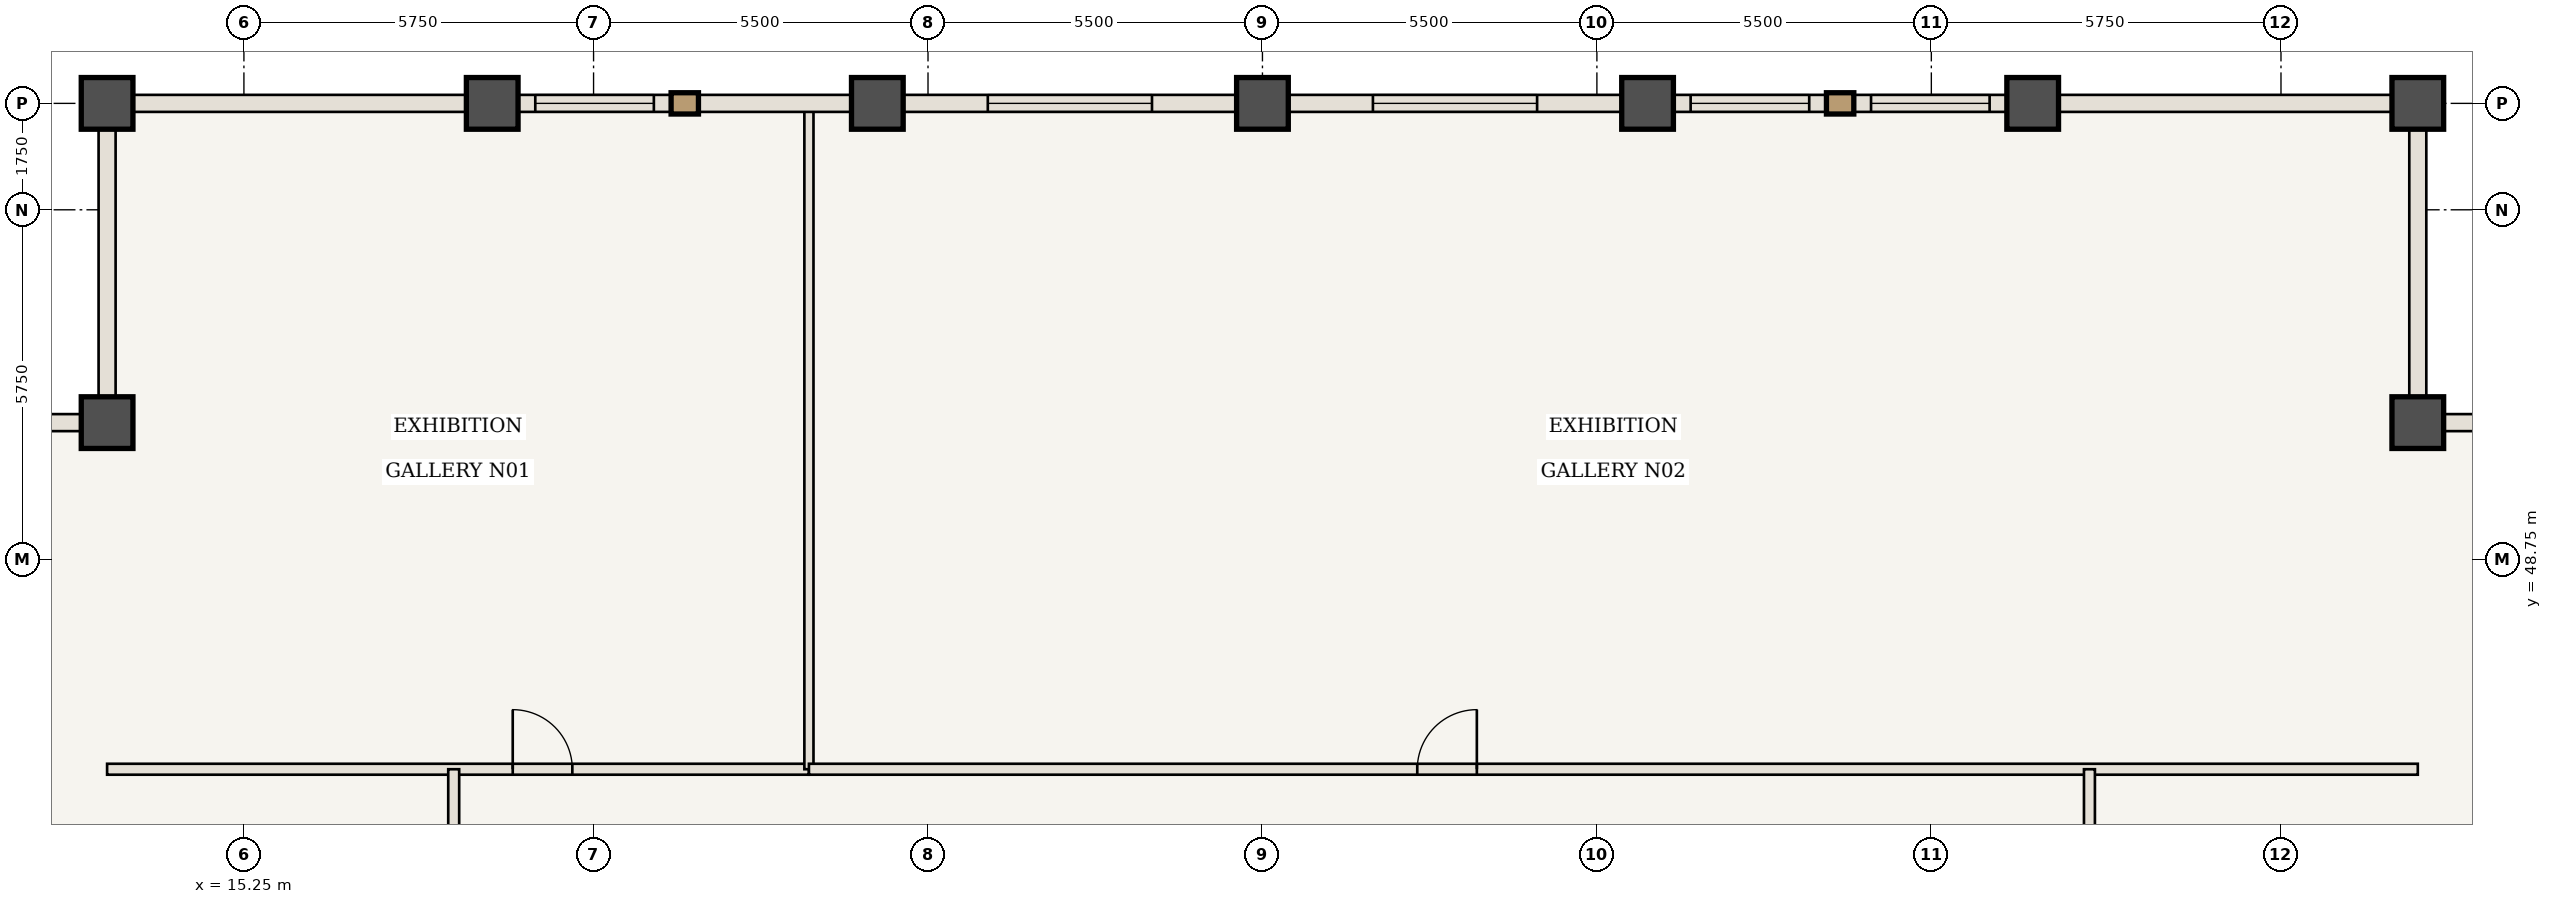
"""IFC4 building model, lengths in metres.
Left out: names, types, materials, properties, quantities, classifications, styles, units other than length and angle.
Written with IfcOpenShell. Run it as: python <this file> out.ifc"""

import sys

from ifc_helpers import new_model, si_unit, direction, frame, frame_2d, origin, origin_2d, place, context, subcontext, project, spatial, rectangle, extrude, element, fill, save


model = new_model("IFC4")
c1 = context("Model", 3, precision=1e-05, world=origin(), true_north=direction((0.0, 1.0)))
c2 = subcontext(c1, "Body", "Model", "MODEL_VIEW")
j1 = project(units=[si_unit("LENGTHUNIT", "METRE"), si_unit("PLANEANGLEUNIT", "RADIAN")], contexts=[c1])
p1 = place(None, origin())
s1 = spatial("IfcSite", under=j1, at=p1, CompositionType="ELEMENT")
p2 = place(p1, origin())
s2 = spatial("IfcBuilding", under=s1, at=p2, CompositionType="ELEMENT")
p3 = place(p2, frame((0.0, 0.0, 210.0)))
s3 = spatial("IfcBuildingStorey", under=s2, at=p3, CompositionType="ELEMENT", Elevation=210.0)
for number, where, z_axis, x_axis in (
    (1, (51.0, 51.0, 0.0), (0.0, 0.0, 1.0), (1.0, 0.0, 0.0)),
    (2, (51.0, 56.25, 0.0), (0.0, 0.0, 1.0), (1.0, 0.0, 0.0)),
    (3, (13.0, 56.25, 0.0), (0.0, 0.0, 1.0), (1.0, 0.0, 0.0)),
    (4, (13.0, 51.0, 0.0), (0.0, 0.0, 1.0), (1.0, 0.0, 0.0)),
    (5, (19.333, 56.25, 0.0), (0.0, 0.0, 1.0), (1.0, 0.0, 0.0)),
    (6, (25.667, 56.25, 0.0), (0.0, 0.0, 1.0), (1.0, 0.0, 0.0)),
    (7, (32.0, 56.25, 0.0), (0.0, 0.0, 1.0), (1.0, 0.0, 0.0)),
    (8, (38.333, 56.25, 0.0), (0.0, 0.0, 1.0), (1.0, 0.0, 0.0)),
    (9, (44.667, 56.25, 0.0), (0.0, 0.0, 1.0), (1.0, 0.0, 0.0)),
):
    element("IfcColumn", number, at=place(p3, frame(where, z_axis=z_axis, x_axis=x_axis)), inside=s3, PredefinedType="COLUMN", context=c2, shape_type="SweptSolid", body=[
        extrude(rectangle(XDim=0.85, YDim=0.85, at=origin_2d()), origin(), (0.0, 0.0, 1.0), 3.85),
    ])
p4 = place(p3, frame((13.0, 45.3, 0.0), z_axis=(0.0, 0.0, 1.0), x_axis=(1.0, 0.0, 0.0)))
e10 = element("IfcWall", 10, at=p4, inside=s3, PredefinedType="STANDARD", context=c2, shape_type="SweptSolid", body=[
    extrude(rectangle(XDim=11.542, YDim=0.18, at=frame_2d((5.771, 0.0))), origin(), (0.0, 0.0, 1.0), 3.685),
])
p5 = place(p4, frame((6.671, 0.0, 0.0)))
e11 = element("IfcOpeningElement", 11, at=p5, cuts=e10, PredefinedType="OPENING", context=c2, shape_type="SweptSolid", body=[
    extrude(rectangle(XDim=0.98, YDim=2.2, at=frame_2d((0.49, 1.1))), frame((0.0, 0.1, 0.0), z_axis=(0.0, -1.0, 0.0), x_axis=(1.0, 0.0, 0.0)), (0.0, 0.0, 1.0), 0.2),
])
p6 = place(p3, frame((24.542, 45.3, 0.0), z_axis=(0.0, 0.0, 1.0), x_axis=(0.0, 1.0, 0.0)))
e12 = element("IfcWall", 12, at=p6, inside=s3, PredefinedType="STANDARD", context=c2, shape_type="SweptSolid", body=[
    extrude(rectangle(XDim=10.89, YDim=0.15, at=frame_2d((5.445, 0.0))), origin(), (0.0, 0.0, 1.0), 3.685),
])
p7 = place(p3, frame((24.542, 45.3, 0.0), z_axis=(0.0, 0.0, 1.0), x_axis=(1.0, 0.0, 0.0)))
e13 = element("IfcWall", 13, at=p7, inside=s3, PredefinedType="STANDARD", context=c2, shape_type="SweptSolid", body=[
    extrude(rectangle(XDim=26.458, YDim=0.18, at=frame_2d((13.229, 0.0))), origin(), (0.0, 0.0, 1.0), 3.685),
])
p8 = place(p7, frame((10.004, 0.0, 0.0)))
e14 = element("IfcOpeningElement", 14, at=p8, cuts=e13, PredefinedType="OPENING", context=c2, shape_type="SweptSolid", body=[
    extrude(rectangle(XDim=0.98, YDim=2.2, at=frame_2d((0.49, 1.1))), frame((0.0, 0.1, 0.0), z_axis=(0.0, -1.0, 0.0), x_axis=(1.0, 0.0, 0.0)), (0.0, 0.0, 1.0), 0.2),
])
p9 = place(p3, frame((18.7, 39.258, 0.0), z_axis=(0.0, 0.0, 1.0), x_axis=(0.0, 1.0, 0.0)))
e15 = element("IfcWall", 15, at=p9, inside=s3, PredefinedType="STANDARD", context=c2, shape_type="SweptSolid", body=[
    extrude(rectangle(XDim=6.042, YDim=0.18, at=frame_2d((3.021, 0.0))), origin(), (0.0, 0.0, 1.0), 3.685),
])
p10 = place(p9, frame((1.071, 0.0, 0.0)))
e16 = element("IfcOpeningElement", 16, at=p10, cuts=e15, PredefinedType="OPENING", context=c2, shape_type="SweptSolid", body=[
    extrude(rectangle(XDim=0.98, YDim=2.2, at=frame_2d((0.49, 1.1))), frame((0.0, 0.1, 0.0), z_axis=(0.0, -1.0, 0.0), x_axis=(1.0, 0.0, 0.0)), (0.0, 0.0, 1.0), 0.2),
])
p11 = place(p3, frame((45.6, 32.85, 0.0), z_axis=(0.0, 0.0, 1.0), x_axis=(0.0, 1.0, 0.0)))
e17 = element("IfcWall", 17, at=p11, inside=s3, PredefinedType="STANDARD", context=c2, shape_type="SweptSolid", body=[
    extrude(rectangle(XDim=12.45, YDim=0.18, at=frame_2d((6.225, 0.0))), origin(), (0.0, 0.0, 1.0), 3.685),
])
p12 = place(p11, frame((5.725, 0.0, 0.0)))
e18 = element("IfcOpeningElement", 18, at=p12, cuts=e17, PredefinedType="OPENING", context=c2, shape_type="SweptSolid", body=[
    extrude(rectangle(XDim=0.98, YDim=2.2, at=frame_2d((0.49, 1.1))), frame((0.0, 0.1, 0.0), z_axis=(0.0, -1.0, 0.0), x_axis=(1.0, 0.0, 0.0)), (0.0, 0.0, 1.0), 0.2),
])
p13 = place(p3, frame((13.0, 56.25, 0.0), z_axis=(0.0, 0.0, 1.0), x_axis=(1.0, 0.0, 0.0)))
e19 = element("IfcWall", 19, at=p13, inside=s3, PredefinedType="USERDEFINED", context=c2, shape_type="SweptSolid", body=[
    extrude(rectangle(XDim=6.333, YDim=0.28, at=frame_2d((3.167, 0.0))), origin(), (0.0, 0.0, 1.0), 2.985),
])
p14 = place(p3, frame((19.333, 56.25, 0.0), z_axis=(0.0, 0.0, 1.0), x_axis=(1.0, 0.0, 0.0)))
e20 = element("IfcWall", 20, at=p14, inside=s3, PredefinedType="USERDEFINED", context=c2, shape_type="SweptSolid", body=[
    extrude(rectangle(XDim=6.333, YDim=0.28, at=frame_2d((3.167, 0.0))), origin(), (0.0, 0.0, 1.0), 2.985),
])
p15 = place(p14, frame((0.708, 0.0, 0.85)))
e21 = element("IfcOpeningElement", 21, at=p15, cuts=e20, PredefinedType="OPENING", context=c2, shape_type="SweptSolid", body=[
    extrude(rectangle(XDim=1.95, YDim=1.935, at=frame_2d((0.975, 0.968))), frame((0.0, 0.15, 0.0), z_axis=(0.0, -1.0, 0.0), x_axis=(1.0, 0.0, 0.0)), (0.0, 0.0, 1.0), 0.3),
])
p16 = place(p3, frame((25.667, 56.25, 0.0), z_axis=(0.0, 0.0, 1.0), x_axis=(1.0, 0.0, 0.0)))
e22 = element("IfcWall", 22, at=p16, inside=s3, PredefinedType="USERDEFINED", context=c2, shape_type="SweptSolid", body=[
    extrude(rectangle(XDim=6.333, YDim=0.28, at=frame_2d((3.167, 0.0))), origin(), (0.0, 0.0, 1.0), 2.985),
])
p17 = place(p16, frame((1.817, 0.0, 0.85)))
e23 = element("IfcOpeningElement", 23, at=p17, cuts=e22, PredefinedType="OPENING", context=c2, shape_type="SweptSolid", body=[
    extrude(rectangle(XDim=2.7, YDim=1.935, at=frame_2d((1.35, 0.968))), frame((0.0, 0.15, 0.0), z_axis=(0.0, -1.0, 0.0), x_axis=(1.0, 0.0, 0.0)), (0.0, 0.0, 1.0), 0.3),
])
p18 = place(p3, frame((32.0, 56.25, 0.0), z_axis=(0.0, 0.0, 1.0), x_axis=(1.0, 0.0, 0.0)))
e24 = element("IfcWall", 24, at=p18, inside=s3, PredefinedType="USERDEFINED", context=c2, shape_type="SweptSolid", body=[
    extrude(rectangle(XDim=6.333, YDim=0.28, at=frame_2d((3.167, 0.0))), origin(), (0.0, 0.0, 1.0), 2.985),
])
p19 = place(p18, frame((1.817, 0.0, 0.85)))
e25 = element("IfcOpeningElement", 25, at=p19, cuts=e24, PredefinedType="OPENING", context=c2, shape_type="SweptSolid", body=[
    extrude(rectangle(XDim=2.7, YDim=1.935, at=frame_2d((1.35, 0.968))), frame((0.0, 0.15, 0.0), z_axis=(0.0, -1.0, 0.0), x_axis=(1.0, 0.0, 0.0)), (0.0, 0.0, 1.0), 0.3),
])
p20 = place(p3, frame((38.333, 56.25, 0.0), z_axis=(0.0, 0.0, 1.0), x_axis=(1.0, 0.0, 0.0)))
e26 = element("IfcWall", 26, at=p20, inside=s3, PredefinedType="USERDEFINED", context=c2, shape_type="SweptSolid", body=[
    extrude(rectangle(XDim=6.333, YDim=0.28, at=frame_2d((3.167, 0.0))), origin(), (0.0, 0.0, 1.0), 2.985),
])
p21 = place(p20, frame((0.708, 0.0, 0.85)))
e27 = element("IfcOpeningElement", 27, at=p21, cuts=e26, PredefinedType="OPENING", context=c2, shape_type="SweptSolid", body=[
    extrude(rectangle(XDim=1.95, YDim=1.935, at=frame_2d((0.975, 0.968))), frame((0.0, 0.15, 0.0), z_axis=(0.0, -1.0, 0.0), x_axis=(1.0, 0.0, 0.0)), (0.0, 0.0, 1.0), 0.3),
])
p22 = place(p20, frame((3.675, 0.0, 0.85)))
e28 = element("IfcOpeningElement", 28, at=p22, cuts=e26, PredefinedType="OPENING", context=c2, shape_type="SweptSolid", body=[
    extrude(rectangle(XDim=1.95, YDim=1.935, at=frame_2d((0.975, 0.968))), frame((0.0, 0.15, 0.0), z_axis=(0.0, -1.0, 0.0), x_axis=(1.0, 0.0, 0.0)), (0.0, 0.0, 1.0), 0.3),
])
p23 = place(p3, frame((44.667, 56.25, 0.0), z_axis=(0.0, 0.0, 1.0), x_axis=(1.0, 0.0, 0.0)))
e29 = element("IfcWall", 29, at=p23, inside=s3, PredefinedType="USERDEFINED", context=c2, shape_type="SweptSolid", body=[
    extrude(rectangle(XDim=6.333, YDim=0.28, at=frame_2d((3.167, 0.0))), origin(), (0.0, 0.0, 1.0), 2.985),
])
for number, where, z_axis, x_axis in (
    (30, (51.0, 51.0, 0.0), (0.0, 0.0, 1.0), (1.0, 0.0, 0.0)),
    (31, (51.0, 56.25, 0.0), (0.0, 0.0, 1.0), (0.0, -1.0, 0.0)),
    (32, (13.0, 51.0, 0.0), (0.0, 0.0, 1.0), (0.0, 1.0, 0.0)),
    (33, (7.75, 51.0, 0.0), (0.0, 0.0, 1.0), (1.0, 0.0, 0.0)),
):
    element("IfcWall", number, at=place(p3, frame(where, z_axis=z_axis, x_axis=x_axis)), inside=s3, PredefinedType="USERDEFINED", context=c2, shape_type="SweptSolid", body=[
        extrude(rectangle(XDim=5.25, YDim=0.28, at=frame_2d((2.625, 0.0))), origin(), (0.0, 0.0, 1.0), 2.985),
    ])
p24 = place(p5, origin())
e34 = element("IfcDoor", 34, at=p24, inside=s3, OperationType="SINGLE_SWING_LEFT", PredefinedType="DOOR", context=c2, shape_type="SweptSolid", body=[
    extrude(rectangle(XDim=0.98, YDim=2.2, at=frame_2d((0.49, 1.1))), frame((0.0, 0.025, 0.0), z_axis=(0.0, -1.0, 0.0), x_axis=(1.0, 0.0, 0.0)), (0.0, 0.0, 1.0), 0.05),
])
fill(e11, e34)
p25 = place(p8, origin())
e35 = element("IfcDoor", 35, at=p25, inside=s3, OperationType="SINGLE_SWING_RIGHT", PredefinedType="DOOR", context=c2, shape_type="SweptSolid", body=[
    extrude(rectangle(XDim=0.98, YDim=2.2, at=frame_2d((0.49, 1.1))), frame((0.0, 0.025, 0.0), z_axis=(0.0, -1.0, 0.0), x_axis=(1.0, 0.0, 0.0)), (0.0, 0.0, 1.0), 0.05),
])
fill(e14, e35)
p26 = place(p15, origin())
e36 = element("IfcWindow", 36, at=p26, inside=s3, PartitioningType="SINGLE_PANEL", PredefinedType="WINDOW", context=c2, shape_type="SweptSolid", body=[
    extrude(rectangle(XDim=1.95, YDim=1.935, at=frame_2d((0.975, 0.968))), frame((0.0, 0.03, 0.0), z_axis=(0.0, -1.0, 0.0), x_axis=(1.0, 0.0, 0.0)), (0.0, 0.0, 1.0), 0.06),
])
fill(e21, e36)
p27 = place(p17, origin())
e37 = element("IfcWindow", 37, at=p27, inside=s3, PartitioningType="SINGLE_PANEL", PredefinedType="WINDOW", context=c2, shape_type="SweptSolid", body=[
    extrude(rectangle(XDim=2.7, YDim=1.935, at=frame_2d((1.35, 0.968))), frame((0.0, 0.03, 0.0), z_axis=(0.0, -1.0, 0.0), x_axis=(1.0, 0.0, 0.0)), (0.0, 0.0, 1.0), 0.06),
])
fill(e23, e37)
p28 = place(p19, origin())
e38 = element("IfcWindow", 38, at=p28, inside=s3, PartitioningType="SINGLE_PANEL", PredefinedType="WINDOW", context=c2, shape_type="SweptSolid", body=[
    extrude(rectangle(XDim=2.7, YDim=1.935, at=frame_2d((1.35, 0.968))), frame((0.0, 0.03, 0.0), z_axis=(0.0, -1.0, 0.0), x_axis=(1.0, 0.0, 0.0)), (0.0, 0.0, 1.0), 0.06),
])
fill(e25, e38)
p29 = place(p21, origin())
e39 = element("IfcWindow", 39, at=p29, inside=s3, PartitioningType="SINGLE_PANEL", PredefinedType="WINDOW", context=c2, shape_type="SweptSolid", body=[
    extrude(rectangle(XDim=1.95, YDim=1.935, at=frame_2d((0.975, 0.968))), frame((0.0, 0.03, 0.0), z_axis=(0.0, -1.0, 0.0), x_axis=(1.0, 0.0, 0.0)), (0.0, 0.0, 1.0), 0.06),
])
fill(e27, e39)
p30 = place(p22, origin())
e40 = element("IfcWindow", 40, at=p30, inside=s3, PartitioningType="SINGLE_PANEL", PredefinedType="WINDOW", context=c2, shape_type="SweptSolid", body=[
    extrude(rectangle(XDim=1.95, YDim=1.935, at=frame_2d((0.975, 0.968))), frame((0.0, 0.03, 0.0), z_axis=(0.0, -1.0, 0.0), x_axis=(1.0, 0.0, 0.0)), (0.0, 0.0, 1.0), 0.06),
])
fill(e28, e40)
save(model, sys.argv[1])
